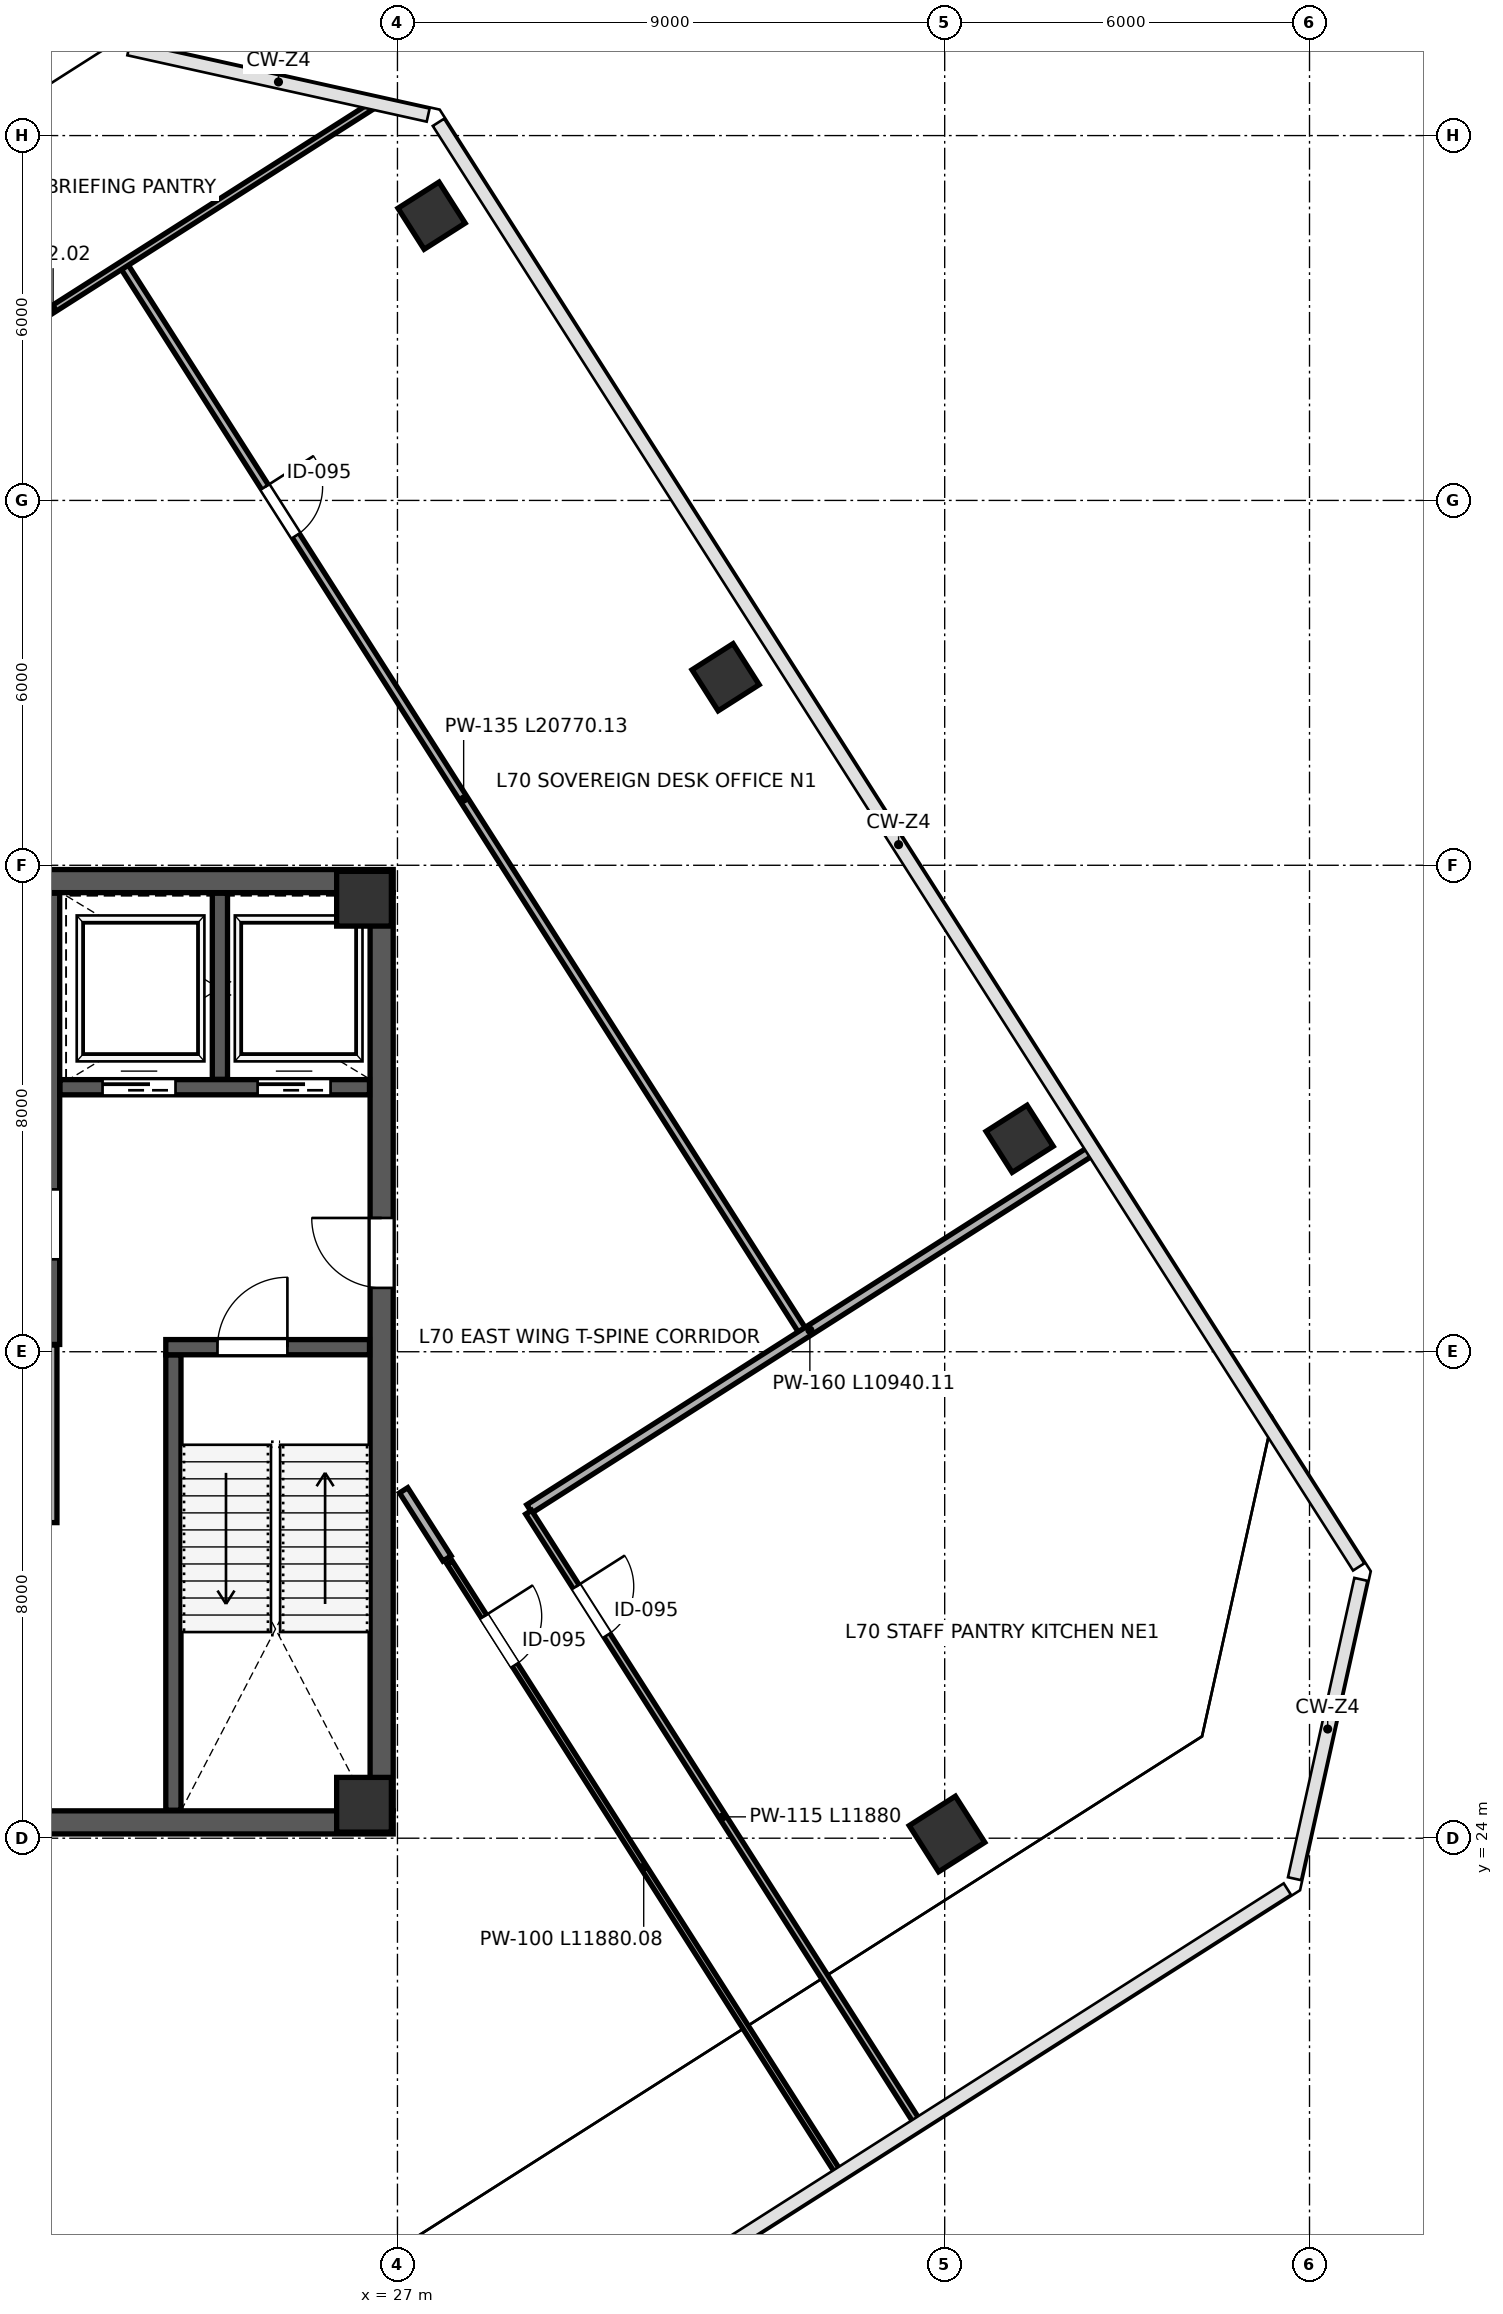
"""IFC4 building model, lengths in metres.
Left out: names, types, materials, properties, quantities, classifications, styles, units other than length and angle.
Written with IfcOpenShell. Run it as: python <this file> out.ifc"""

import sys

from ifc_helpers import new_model, si_unit, direction, frame, frame_2d, origin, origin_2d, place, context, subcontext, project, spatial, rectangle, extrude, source, transform, mapped, element, fill, save


model = new_model("IFC4")
c1 = context("Model", 3, precision=1e-05, world=origin(), true_north=direction((0.0, 1.0)))
c2 = subcontext(c1, "Body", "Model", "MODEL_VIEW")
j1 = project(units=[si_unit("LENGTHUNIT", "METRE"), si_unit("PLANEANGLEUNIT", "RADIAN")], contexts=[c1])
p1 = place(None, origin())
s1 = spatial("IfcSite", under=j1, at=p1, CompositionType="ELEMENT")
p2 = place(p1, origin())
s2 = spatial("IfcBuilding", under=s1, at=p2, CompositionType="ELEMENT")
p3 = place(p2, frame((0.0, 0.0, 311.4)))
s3 = spatial("IfcBuildingStorey", under=s2, at=p3, CompositionType="ELEMENT", Elevation=311.4)
m1 = source(origin(), c2, "Body", "SweptSolid", [
    extrude(rectangle(XDim=0.9, YDim=0.9, at=origin_2d()), origin(), (0.0, 0.0, 1.0), 4.199),
])
for number, where, z_axis, x_axis in (
    (1, (26.45, 24.55, 0.001), (0.0, 0.0, 1.0), (1.0, 0.0, 0.0)),
    (2, (26.45, 39.45, 0.001), (0.0, 0.0, 1.0), (1.0, 0.0, 0.0)),
):
    element("IfcColumn", number, at=place(p3, frame(where, z_axis=z_axis, x_axis=x_axis)), inside=s3, PredefinedType="COLUMN", context=c2, shape_type="MappedRepresentation", body=[
        mapped(m1, transform((0.0, 0.0, 0.0), scale=1.0)),
    ])
m2 = source(origin(), c2, "Body", "SweptSolid", [
    extrude(rectangle(XDim=0.8, YDim=0.8, at=origin_2d()), origin(), (0.0, 0.0, 1.0), 4.199),
])
for number, where, z_axis, x_axis in (
    (3, (27.561, 50.683, 0.001), (0.0, 0.0, 1.0), (-0.537, 0.843, 0.0)),
    (4, (32.397, 43.092, 0.001), (0.0, 0.0, 1.0), (-0.537, 0.843, 0.0)),
    (5, (37.232, 35.501, 0.001), (0.0, 0.0, 1.0), (-0.537, 0.843, 0.0)),
):
    element("IfcColumn", number, at=place(p3, frame(where, z_axis=z_axis, x_axis=x_axis)), inside=s3, PredefinedType="COLUMN", context=c2, shape_type="MappedRepresentation", body=[
        mapped(m2, transform((0.0, 0.0, 0.0), scale=1.0)),
    ])
m3 = source(origin(), c2, "Body", "SweptSolid", [
    extrude(rectangle(XDim=0.9, YDim=0.9, at=origin_2d()), origin(), (0.0, 0.0, 1.0), 4.199),
])
p4 = place(p3, frame((36.038, 24.069, 0.001), z_axis=(0.0, 0.0, 1.0), x_axis=(-0.537299608347, 0.843391445813, 0.0)))
e6 = element("IfcColumn", 6, at=p4, inside=s3, PredefinedType="COLUMN", context=c2, shape_type="MappedRepresentation", body=[
    mapped(m3, transform((0.0, 0.0, 0.0), scale=1.0)),
])
p5 = place(p3, frame((26.74, 24.45, 0.0), z_axis=(0.0, 0.0, 1.0), x_axis=(0.0, 1.0, 0.0)))
e7 = element("IfcWall", 7, at=p5, inside=s3, PredefinedType="SHEAR", context=c2, shape_type="SweptSolid", body=[
    extrude(rectangle(XDim=15.1, YDim=0.38, at=frame_2d((7.55, 0.0))), origin(), (0.0, 0.0, 1.0), 3.96),
])
p6 = place(p5, frame((8.6, 0.0, 0.0)))
e8 = element("IfcOpeningElement", 8, at=p6, cuts=e7, PredefinedType="OPENING", context=c2, shape_type="SweptSolid", body=[
    extrude(rectangle(XDim=1.15, YDim=2.2, at=frame_2d((0.575, 1.1))), frame((0.0, 0.2, 0.0), z_axis=(0.0, -1.0, 0.0), x_axis=(1.0, 0.0, 0.0)), (0.0, 0.0, 1.0), 0.4),
])
for number, where, z_axis, x_axis in (
    (9, (9.07, 24.26, 0.0), (0.0, 0.0, 1.0), (1.0, 0.0, 0.0)),
    (10, (9.07, 39.74, 0.0), (0.0, 0.0, 1.0), (1.0, 0.0, 0.0)),
):
    element("IfcWall", number, at=place(p3, frame(where, z_axis=z_axis, x_axis=x_axis)), inside=s3, PredefinedType="SHEAR", context=c2, shape_type="SweptSolid", body=[
        extrude(rectangle(XDim=17.86, YDim=0.38, at=frame_2d((8.93, 0.0))), origin(), (0.0, 0.0, 1.0), 3.96),
    ])
p7 = place(p3, frame((23.315, 24.46, 0.0), z_axis=(0.0, 0.0, 1.0), x_axis=(0.0, 1.0, 0.0)))
e11 = element("IfcWall", 11, at=p7, inside=s3, PredefinedType="SHEAR", context=c2, shape_type="SweptSolid", body=[
    extrude(rectangle(XDim=7.49, YDim=0.25, at=frame_2d((3.745, 0.0))), origin(), (0.0, 0.0, 1.0), 3.96),
])
p8 = place(p3, frame((23.19, 32.075, 0.0), z_axis=(0.0, 0.0, 1.0), x_axis=(1.0, 0.0, 0.0)))
e12 = element("IfcWall", 12, at=p8, inside=s3, PredefinedType="SHEAR", context=c2, shape_type="SweptSolid", body=[
    extrude(rectangle(XDim=3.35, YDim=0.25, at=frame_2d((1.675, 0.0))), origin(), (0.0, 0.0, 1.0), 3.96),
])
p9 = place(p8, frame((0.85, 0.0, 0.0)))
e13 = element("IfcOpeningElement", 13, at=p9, cuts=e12, PredefinedType="OPENING", context=c2, shape_type="SweptSolid", body=[
    extrude(rectangle(XDim=1.15, YDim=2.2, at=frame_2d((0.575, 1.1))), frame((0.0, 0.135, 0.0), z_axis=(0.0, -1.0, 0.0), x_axis=(1.0, 0.0, 0.0)), (0.0, 0.0, 1.0), 0.27),
])
p10 = place(p3, frame((21.32, 32.12, 0.0), z_axis=(0.0, 0.0, 1.0), x_axis=(0.0, 1.0, 0.0)))
e14 = element("IfcWall", 14, at=p10, inside=s3, PredefinedType="SHEAR", context=c2, shape_type="SweptSolid", body=[
    extrude(rectangle(XDim=7.42, YDim=0.25, at=frame_2d((3.71, 0.0))), origin(), (0.0, 0.0, 1.0), 3.96),
])
p11 = place(p10, frame((1.4, 0.0, 0.0)))
e15 = element("IfcOpeningElement", 15, at=p11, cuts=e14, PredefinedType="OPENING", context=c2, shape_type="SweptSolid", body=[
    extrude(rectangle(XDim=1.15, YDim=2.2, at=frame_2d((0.575, 1.1))), frame((0.0, 0.135, 0.0), z_axis=(0.0, -1.0, 0.0), x_axis=(1.0, 0.0, 0.0)), (0.0, 0.0, 1.0), 0.27),
])
p12 = place(p3, frame((21.45, 36.35, 0.0), z_axis=(0.0, 0.0, 1.0), x_axis=(1.0, 0.0, 0.0)))
e16 = element("IfcWall", 16, at=p12, inside=s3, PredefinedType="SHEAR", context=c2, shape_type="SweptSolid", body=[
    extrude(rectangle(XDim=5.09, YDim=0.25, at=frame_2d((2.545, 0.0))), origin(), (0.0, 0.0, 1.0), 3.96),
])
p13 = place(p12, frame((0.7, 0.0, 0.0)))
e17 = element("IfcOpeningElement", 17, at=p13, cuts=e16, PredefinedType="OPENING", context=c2, shape_type="SweptSolid", body=[
    extrude(rectangle(XDim=1.2, YDim=2.2, at=frame_2d((0.6, 1.1))), frame((0.0, 0.135, 0.0), z_axis=(0.0, -1.0, 0.0), x_axis=(1.0, 0.0, 0.0)), (0.0, 0.0, 1.0), 0.27),
])
p14 = place(p12, frame((3.25, 0.0, 0.0)))
e18 = element("IfcOpeningElement", 18, at=p14, cuts=e16, PredefinedType="OPENING", context=c2, shape_type="SweptSolid", body=[
    extrude(rectangle(XDim=1.2, YDim=2.2, at=frame_2d((0.6, 1.1))), frame((0.0, 0.135, 0.0), z_axis=(0.0, -1.0, 0.0), x_axis=(1.0, 0.0, 0.0)), (0.0, 0.0, 1.0), 0.27),
])
p15 = place(p3, frame((24.08, 36.48, 0.0), z_axis=(0.0, 0.0, 1.0), x_axis=(0.0, 1.0, 0.0)))
e19 = element("IfcWall", 19, at=p15, inside=s3, PredefinedType="SHEAR", context=c2, shape_type="SweptSolid", body=[
    extrude(rectangle(XDim=3.06, YDim=0.25, at=frame_2d((1.53, 0.0))), origin(), (0.0, 0.0, 1.0), 3.96),
])
p16 = place(p3, frame((21.32, 29.19, 0.0), z_axis=(0.0, 0.0, 1.0), x_axis=(0.0, 1.0, 0.0)))
e20 = element("IfcWall", 20, at=p16, inside=s3, PredefinedType="PARTITIONING", context=c2, shape_type="SweptSolid", body=[
    extrude(rectangle(XDim=2.92, YDim=0.16, at=frame_2d((1.46, 0.0))), origin(), (0.0, 0.0, 1.0), 3.96),
])
p17 = place(p3, frame((27.102, 29.721, 0.0), z_axis=(0.0, 0.0, 1.0), x_axis=(0.537279676557, -0.843404143432, 0.0)))
e21 = element("IfcWall", 21, at=p17, inside=s3, PredefinedType="PARTITIONING", context=c2, shape_type="SweptSolid", body=[
    extrude(rectangle(XDim=1.329, YDim=0.16, at=frame_2d((0.664, 0.0))), origin(), (0.0, 0.0, 1.0), 3.96),
])
p18 = place(p3, frame((22.509, 49.847, 0.0), z_axis=(0.0, 0.0, 1.0), x_axis=(0.537290700932, -0.843397120396, 0.0)))
e22 = element("IfcWall", 22, at=p18, inside=s3, PredefinedType="PARTITIONING", context=c2, shape_type="SweptSolid", body=[
    extrude(rectangle(XDim=20.77, YDim=0.135, at=frame_2d((10.385, 0.0))), origin(), (0.0, 0.0, 1.0), 3.96),
])
p19 = place(p18, frame((4.3, 0.0, 0.0)))
e23 = element("IfcOpeningElement", 23, at=p19, cuts=e22, PredefinedType="OPENING", context=c2, shape_type="SweptSolid", body=[
    extrude(rectangle(XDim=0.95, YDim=2.15, at=frame_2d((0.475, 1.075))), frame((0.0, 0.078, 0.0), z_axis=(0.0, -1.0, 0.0), x_axis=(1.0, 0.0, 0.0)), (0.0, 0.0, 1.0), 0.155),
])
p20 = place(p3, frame((16.077, 45.797, 0.0), z_axis=(0.0, 0.0, 1.0), x_axis=(0.843392973199, 0.537297210824, 0.0)))
e24 = element("IfcWall", 24, at=p20, inside=s3, PredefinedType="PARTITIONING", context=c2, shape_type="SweptSolid", body=[
    extrude(rectangle(XDim=12.472, YDim=0.115, at=frame_2d((6.236, 0.0))), origin(), (0.0, 0.0, 1.0), 3.96),
])
p21 = place(p3, frame((29.169, 29.416, 0.0), z_axis=(0.0, 0.0, 1.0), x_axis=(0.843389386546, 0.537302840734, 0.0)))
e25 = element("IfcWall", 25, at=p21, inside=s3, PredefinedType="PARTITIONING", context=c2, shape_type="SweptSolid", body=[
    extrude(rectangle(XDim=10.94, YDim=0.16, at=frame_2d((5.47, 0.0))), origin(), (0.0, 0.0, 1.0), 3.96),
])
p22 = place(p3, frame((29.157, 29.361, 0.0), z_axis=(0.0, 0.0, 1.0), x_axis=(0.537294294715, -0.843394830946, 0.0)))
e26 = element("IfcWall", 26, at=p22, inside=s3, PredefinedType="PARTITIONING", context=c2, shape_type="SweptSolid", body=[
    extrude(rectangle(XDim=11.88, YDim=0.115, at=frame_2d((5.94, 0.0))), origin(), (0.0, 0.0, 1.0), 3.253),
])
p23 = place(p22, frame((1.45, 0.0, 0.0)))
e27 = element("IfcOpeningElement", 27, at=p23, cuts=e26, PredefinedType="OPENING", context=c2, shape_type="SweptSolid", body=[
    extrude(rectangle(XDim=0.95, YDim=2.15, at=frame_2d((0.475, 1.075))), frame((0.0, 0.067, 0.0), z_axis=(0.0, -1.0, 0.0), x_axis=(1.0, 0.0, 0.0)), (0.0, 0.0, 1.0), 0.135),
])
p24 = place(p3, frame((27.858, 28.533, 0.0), z_axis=(0.0, 0.0, 1.0), x_axis=(0.537294294715, -0.843394830946, 0.0)))
e28 = element("IfcWall", 28, at=p24, inside=s3, PredefinedType="PARTITIONING", context=c2, shape_type="SweptSolid", body=[
    extrude(rectangle(XDim=11.88, YDim=0.1, at=frame_2d((5.94, 0.0))), origin(), (0.0, 0.0, 1.0), 3.253),
])
p25 = place(p24, frame((1.05, 0.0, 0.0)))
e29 = element("IfcOpeningElement", 29, at=p25, cuts=e28, PredefinedType="OPENING", context=c2, shape_type="SweptSolid", body=[
    extrude(rectangle(XDim=0.95, YDim=2.15, at=frame_2d((0.475, 1.075))), frame((0.0, 0.06, 0.0), z_axis=(0.0, -1.0, 0.0), x_axis=(1.0, 0.0, 0.0)), (0.0, 0.0, 1.0), 0.12),
])
m4 = source(origin(), c2, "Body", "SweptSolid", [
    extrude(rectangle(XDim=1.15, YDim=2.2, at=frame_2d((0.575, 1.1))), frame((0.0, 0.025, 0.0), z_axis=(0.0, -1.0, 0.0), x_axis=(1.0, 0.0, 0.0)), (0.0, 0.0, 1.0), 0.05),
])
p26 = place(p11, origin())
e30 = element("IfcDoor", 30, at=p26, inside=s3, OperationType="SINGLE_SWING_LEFT", PredefinedType="DOOR", context=c2, shape_type="MappedRepresentation", body=[
    mapped(m4, transform((0.0, 0.0, 0.0), scale=1.0)),
])
fill(e15, e30)
m5 = source(origin(), c2, "Body", "SweptSolid", [
    extrude(rectangle(XDim=1.15, YDim=2.2, at=frame_2d((0.575, 1.1))), frame((0.0, 0.025, 0.0), z_axis=(0.0, -1.0, 0.0), x_axis=(1.0, 0.0, 0.0)), (0.0, 0.0, 1.0), 0.05),
])
p27 = place(p9, origin())
e31 = element("IfcDoor", 31, at=p27, inside=s3, OperationType="SINGLE_SWING_RIGHT", PredefinedType="DOOR", context=c2, shape_type="MappedRepresentation", body=[
    mapped(m5, transform((0.0, 0.0, 0.0), scale=1.0)),
])
fill(e13, e31)
p28 = place(p6, origin())
e32 = element("IfcDoor", 32, at=p28, inside=s3, OperationType="SINGLE_SWING_RIGHT", PredefinedType="DOOR", context=c2, shape_type="MappedRepresentation", body=[
    mapped(m4, transform((0.0, 0.0, 0.0), scale=1.0)),
])
fill(e8, e32)
m6 = source(origin(), c2, "Body", "SweptSolid", [
    extrude(rectangle(XDim=1.2, YDim=2.2, at=frame_2d((0.6, 1.1))), frame((0.0, 0.025, 0.0), z_axis=(0.0, -1.0, 0.0), x_axis=(1.0, 0.0, 0.0)), (0.0, 0.0, 1.0), 0.05),
])
p29 = place(p13, origin())
e33 = element("IfcDoor", 33, at=p29, inside=s3, OperationType="SLIDING_TO_LEFT", PredefinedType="DOOR", context=c2, shape_type="MappedRepresentation", body=[
    mapped(m6, transform((0.0, 0.0, 0.0), scale=1.0)),
])
fill(e17, e33)
p30 = place(p14, origin())
e34 = element("IfcDoor", 34, at=p30, inside=s3, OperationType="SLIDING_TO_RIGHT", PredefinedType="DOOR", context=c2, shape_type="MappedRepresentation", body=[
    mapped(m6, transform((0.0, 0.0, 0.0), scale=1.0)),
])
fill(e18, e34)
m7 = source(origin(), c2, "Body", "SweptSolid", [
    extrude(rectangle(XDim=0.95, YDim=2.15, at=frame_2d((0.475, 1.075))), frame((0.0, 0.025, 0.0), z_axis=(0.0, -1.0, 0.0), x_axis=(1.0, 0.0, 0.0)), (0.0, 0.0, 1.0), 0.05),
])
p31 = place(p19, origin())
e35 = element("IfcDoor", 35, at=p31, inside=s3, OperationType="SINGLE_SWING_LEFT", PredefinedType="DOOR", context=c2, shape_type="MappedRepresentation", body=[
    mapped(m7, transform((0.0, 0.0, 0.0), scale=1.0)),
])
fill(e23, e35)
p32 = place(p23, origin())
e36 = element("IfcDoor", 36, at=p32, inside=s3, OperationType="SINGLE_SWING_LEFT", PredefinedType="DOOR", context=c2, shape_type="MappedRepresentation", body=[
    mapped(m7, transform((0.0, 0.0, 0.0), scale=1.0)),
])
fill(e27, e36)
p33 = place(p25, origin())
e37 = element("IfcDoor", 37, at=p33, inside=s3, OperationType="SINGLE_SWING_LEFT", PredefinedType="DOOR", context=c2, shape_type="MappedRepresentation", body=[
    mapped(m7, transform((0.0, 0.0, 0.0), scale=1.0)),
])
fill(e29, e37)
save(model, sys.argv[1])
